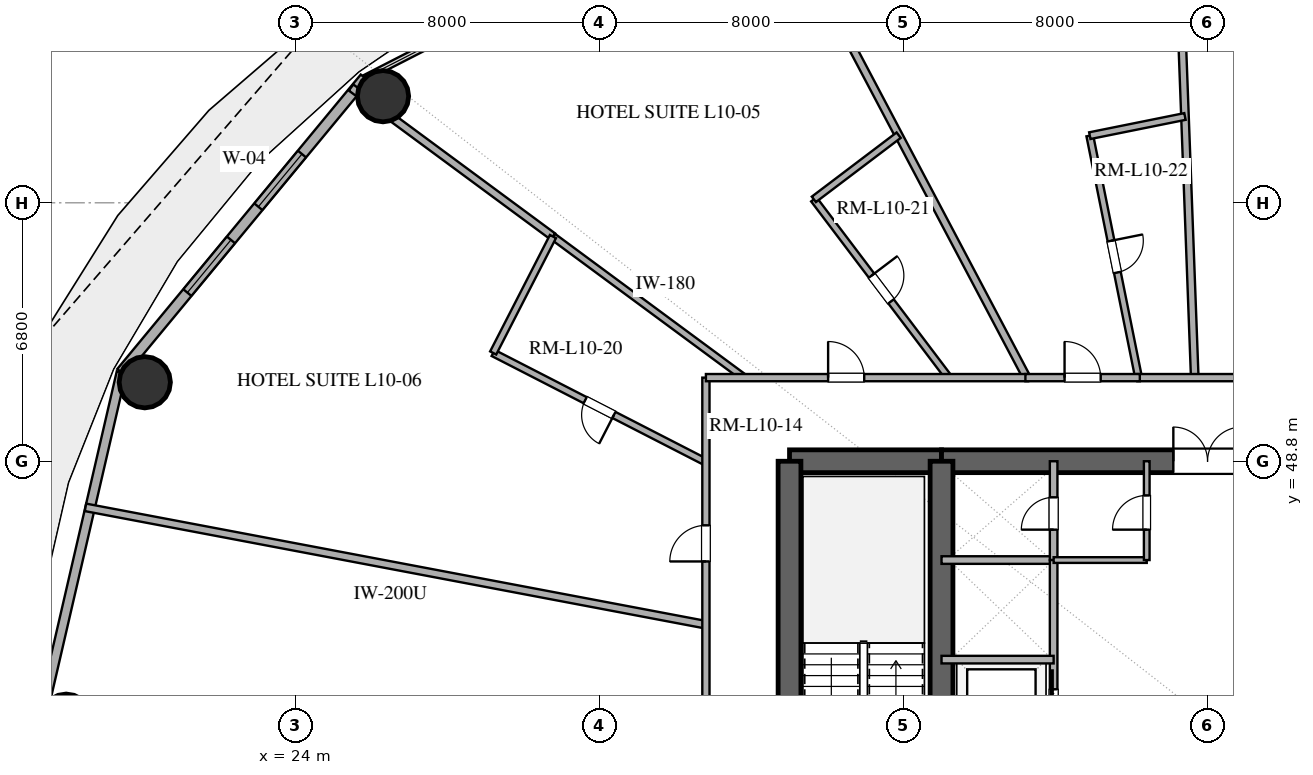
"""IFC4 building model, lengths in metres.
Left out: names, types, materials, properties, quantities, classifications, styles, units other than length and angle.
Written with IfcOpenShell. Run it as: python <this file> out.ifc"""

import sys

from ifc_helpers import new_model, si_unit, direction, frame, frame_2d, origin, origin_2d, place, context, subcontext, project, spatial, rectangle, hollow_circle, extrude, element, fill, save


model = new_model("IFC4")
c1 = context("Model", 3, precision=1e-05, world=origin(), true_north=direction((0.0, 1.0)))
c2 = subcontext(c1, "Body", "Model", "MODEL_VIEW")
j1 = project(units=[si_unit("LENGTHUNIT", "METRE"), si_unit("PLANEANGLEUNIT", "RADIAN")], contexts=[c1])
p1 = place(None, origin())
s1 = spatial("IfcSite", under=j1, at=p1, CompositionType="ELEMENT")
p2 = place(p1, origin())
s2 = spatial("IfcBuilding", under=s1, at=p2, CompositionType="ELEMENT")
p3 = place(p2, frame((0.0, 0.0, 46.2)))
s3 = spatial("IfcBuildingStorey", under=s2, at=p3, CompositionType="ELEMENT", Elevation=46.2)
p4 = place(p3, frame((37.0, 48.8, 0.0), z_axis=(0.0, 0.0, 1.0), x_axis=(1.0, 0.0, 0.0)))
e1 = element("IfcWall", 1, at=p4, inside=s3, PredefinedType="SHEAR", context=c2, shape_type="SweptSolid", body=[
    extrude(rectangle(XDim=4.0, YDim=0.6, at=frame_2d((2.0, 0.0))), origin(), (0.0, 0.0, 1.0), 3.38),
])
p5 = place(p3, frame((41.0, 48.8, 0.0), z_axis=(0.0, 0.0, 1.0), x_axis=(1.0, 0.0, 0.0)))
e2 = element("IfcWall", 2, at=p5, inside=s3, PredefinedType="SHEAR", context=c2, shape_type="SweptSolid", body=[
    extrude(rectangle(XDim=14.0, YDim=0.6, at=frame_2d((7.0, 0.0))), origin(), (0.0, 0.0, 1.0), 3.38),
])
p6 = place(p5, frame((6.1, 0.0, 0.0)))
e3 = element("IfcOpeningElement", 3, at=p6, cuts=e2, PredefinedType="OPENING", context=c2, shape_type="SweptSolid", body=[
    extrude(rectangle(XDim=1.8, YDim=2.25, at=frame_2d((0.9, 1.125))), frame((0.0, 0.31, 0.0), z_axis=(0.0, -1.0, 0.0), x_axis=(1.0, 0.0, 0.0)), (0.0, 0.0, 1.0), 0.62),
])
p7 = place(p3, frame((37.0, 35.2, 0.0), z_axis=(0.0, 0.0, 1.0), x_axis=(0.0, 1.0, 0.0)))
e4 = element("IfcWall", 4, at=p7, inside=s3, PredefinedType="SHEAR", context=c2, shape_type="SweptSolid", body=[
    extrude(rectangle(XDim=13.6, YDim=0.6, at=frame_2d((6.8, 0.0))), origin(), (0.0, 0.0, 1.0), 3.38),
])
p8 = place(p7, frame((1.5, 0.0, 0.0)))
e5 = element("IfcOpeningElement", 5, at=p8, cuts=e4, PredefinedType="OPENING", context=c2, shape_type="SweptSolid", body=[
    extrude(rectangle(XDim=1.2, YDim=2.15, at=frame_2d((0.6, 1.075))), frame((0.0, 0.31, 0.0), z_axis=(0.0, -1.0, 0.0), x_axis=(1.0, 0.0, 0.0)), (0.0, 0.0, 1.0), 0.62),
])
p9 = place(p3, frame((41.0, 35.2, 0.0), z_axis=(0.0, 0.0, 1.0), x_axis=(0.0, 1.0, 0.0)))
e6 = element("IfcWall", 6, at=p9, inside=s3, PredefinedType="SHEAR", context=c2, shape_type="SweptSolid", body=[
    extrude(rectangle(XDim=13.6, YDim=0.6, at=frame_2d((6.8, 0.0))), origin(), (0.0, 0.0, 1.0), 3.38),
])
p10 = place(p9, frame((1.15, 0.0, 0.0)))
e7 = element("IfcOpeningElement", 7, at=p10, cuts=e6, PredefinedType="OPENING", context=c2, shape_type="SweptSolid", body=[
    extrude(rectangle(XDim=1.1, YDim=2.2, at=frame_2d((0.55, 1.1))), frame((0.0, 0.31, 0.0), z_axis=(0.0, -1.0, 0.0), x_axis=(1.0, 0.0, 0.0)), (0.0, 0.0, 1.0), 0.62),
])
for number, where, z_axis, x_axis in (
    (8, (26.303, 58.405, 0.0), (0.0, 0.0, 1.0), (1.0, 0.0, 0.0)),
    (9, (20.034, 50.878, 0.0), (0.0, 0.0, 1.0), (1.0, 0.0, 0.0)),
    (10, (17.965, 42.0, 0.0), (0.0, 0.0, 1.0), (1.0, 0.0, 0.0)),
):
    element("IfcColumn", number, at=place(p3, frame(where, z_axis=z_axis, x_axis=x_axis)), inside=s3, PredefinedType="COLUMN", context=c2, shape_type="SweptSolid", body=[
        extrude(hollow_circle(Radius=0.675, WallThickness=0.036, at=origin_2d()), origin(), (0.0, 0.0, 1.0), 3.38),
    ])
p11 = place(p3, frame((25.826, 58.886, 0.0), z_axis=(0.0, 0.0, 1.0), x_axis=(-0.637296809613, -0.770618437657, 0.0)))
e11 = element("IfcWall", 11, at=p11, inside=s3, PredefinedType="SOLIDWALL", context=c2, shape_type="SweptSolid", body=[
    extrude(rectangle(XDim=10.053, YDim=0.28, at=frame_2d((5.027, 0.0))), origin(), (0.0, 0.0, 1.0), 3.38),
])
p12 = place(p11, frame((2.598, 0.0, 0.85)))
e12 = element("IfcOpeningElement", 12, at=p12, cuts=e11, PredefinedType="OPENING", context=c2, shape_type="SweptSolid", body=[
    extrude(rectangle(XDim=1.8, YDim=2.2, at=frame_2d((0.9, 1.1))), frame((0.0, 0.15, 0.0), z_axis=(0.0, -1.0, 0.0), x_axis=(1.0, 0.0, 0.0)), (0.0, 0.0, 1.0), 0.3),
])
p13 = place(p11, frame((5.53, 0.0, 0.85)))
e13 = element("IfcOpeningElement", 13, at=p13, cuts=e11, PredefinedType="OPENING", context=c2, shape_type="SweptSolid", body=[
    extrude(rectangle(XDim=1.8, YDim=2.2, at=frame_2d((0.9, 1.1))), frame((0.0, 0.15, 0.0), z_axis=(0.0, -1.0, 0.0), x_axis=(1.0, 0.0, 0.0)), (0.0, 0.0, 1.0), 0.3),
])
p14 = place(p3, frame((19.419, 51.138, 0.0), z_axis=(0.0, 0.0, 1.0), x_axis=(-0.225454452941, -0.974253709076, 0.0)))
e14 = element("IfcWall", 14, at=p14, inside=s3, PredefinedType="SOLIDWALL", context=c2, shape_type="SweptSolid", body=[
    extrude(rectangle(XDim=9.38, YDim=0.25, at=frame_2d((4.69, 0.0))), origin(), (0.0, 0.0, 1.0), 3.38),
])
p15 = place(p3, frame((41.0, 46.2, 0.0), z_axis=(0.0, 0.0, 1.0), x_axis=(1.0, 0.0, 0.0)))
e15 = element("IfcWall", 15, at=p15, inside=s3, PredefinedType="SOLIDWALL", context=c2, shape_type="SweptSolid", body=[
    extrude(rectangle(XDim=2.95, YDim=0.2, at=frame_2d((1.475, 0.0))), origin(), (0.0, 0.0, 1.0), 2.74),
])
p16 = place(p3, frame((43.95, 46.2, 0.0), z_axis=(0.0, 0.0, 1.0), x_axis=(0.0, 1.0, 0.0)))
e16 = element("IfcWall", 16, at=p16, inside=s3, PredefinedType="SOLIDWALL", context=c2, shape_type="SweptSolid", body=[
    extrude(rectangle(XDim=2.6, YDim=0.2, at=frame_2d((1.3, 0.0))), origin(), (0.0, 0.0, 1.0), 2.74),
])
p17 = place(p16, frame((0.8, 0.0, 0.0)))
e17 = element("IfcOpeningElement", 17, at=p17, cuts=e16, PredefinedType="OPENING", context=c2, shape_type="SweptSolid", body=[
    extrude(rectangle(XDim=0.85, YDim=2.15, at=frame_2d((0.425, 1.075))), frame((0.0, 0.11, 0.0), z_axis=(0.0, -1.0, 0.0), x_axis=(1.0, 0.0, 0.0)), (0.0, 0.0, 1.0), 0.22),
])
p18 = place(p3, frame((43.95, 38.4, 0.0), z_axis=(0.0, 0.0, 1.0), x_axis=(0.0, 1.0, 0.0)))
e18 = element("IfcWall", 18, at=p18, inside=s3, PredefinedType="SOLIDWALL", context=c2, shape_type="SweptSolid", body=[
    extrude(rectangle(XDim=7.8, YDim=0.2, at=frame_2d((3.9, 0.0))), origin(), (0.0, 0.0, 1.0), 2.74),
])
p19 = place(p18, frame((0.7, 0.0, 0.0)))
e19 = element("IfcOpeningElement", 19, at=p19, cuts=e18, PredefinedType="OPENING", context=c2, shape_type="SweptSolid", body=[
    extrude(rectangle(XDim=1.1, YDim=2.2, at=frame_2d((0.55, 1.1))), frame((0.0, 0.11, 0.0), z_axis=(0.0, -1.0, 0.0), x_axis=(1.0, 0.0, 0.0)), (0.0, 0.0, 1.0), 0.22),
])
p20 = place(p18, frame((3.3, 0.0, 0.0)))
e20 = element("IfcOpeningElement", 20, at=p20, cuts=e18, PredefinedType="OPENING", context=c2, shape_type="SweptSolid", body=[
    extrude(rectangle(XDim=1.1, YDim=2.2, at=frame_2d((0.55, 1.1))), frame((0.0, 0.11, 0.0), z_axis=(0.0, -1.0, 0.0), x_axis=(1.0, 0.0, 0.0)), (0.0, 0.0, 1.0), 0.22),
])
p21 = place(p3, frame((41.0, 43.58, 0.0), z_axis=(0.0, 0.0, 1.0), x_axis=(1.0, 0.0, 0.0)))
e21 = element("IfcWall", 21, at=p21, inside=s3, PredefinedType="SOLIDWALL", context=c2, shape_type="SweptSolid", body=[
    extrude(rectangle(XDim=2.95, YDim=0.2, at=frame_2d((1.475, 0.0))), origin(), (0.0, 0.0, 1.0), 2.74),
])
p22 = place(p3, frame((43.95, 46.2, 0.0), z_axis=(0.0, 0.0, 1.0), x_axis=(1.0, 0.0, 0.0)))
e22 = element("IfcWall", 22, at=p22, inside=s3, PredefinedType="PARTITIONING", context=c2, shape_type="SweptSolid", body=[
    extrude(rectangle(XDim=2.45, YDim=0.15, at=frame_2d((1.225, 0.0))), origin(), (0.0, 0.0, 1.0), 2.74),
])
p23 = place(p3, frame((46.4, 46.2, 0.0), z_axis=(0.0, 0.0, 1.0), x_axis=(0.0, 1.0, 0.0)))
e23 = element("IfcWall", 23, at=p23, inside=s3, PredefinedType="PARTITIONING", context=c2, shape_type="SweptSolid", body=[
    extrude(rectangle(XDim=2.6, YDim=0.15, at=frame_2d((1.3, 0.0))), origin(), (0.0, 0.0, 1.0), 2.74),
])
p24 = place(p23, frame((0.8, 0.0, 0.0)))
e24 = element("IfcOpeningElement", 24, at=p24, cuts=e23, PredefinedType="OPENING", context=c2, shape_type="SweptSolid", body=[
    extrude(rectangle(XDim=0.9, YDim=2.15, at=frame_2d((0.45, 1.075))), frame((0.0, 0.085, 0.0), z_axis=(0.0, -1.0, 0.0), x_axis=(1.0, 0.0, 0.0)), (0.0, 0.0, 1.0), 0.17),
])
p25 = place(p3, frame((34.8, 44.498, 0.0), z_axis=(0.0, 0.0, 1.0), x_axis=(-0.982565603173, 0.185916205484, 0.0)))
e25 = element("IfcWall", 25, at=p25, inside=s3, PredefinedType="PARTITIONING", context=c2, shape_type="SweptSolid", body=[
    extrude(rectangle(XDim=16.616, YDim=0.2, at=frame_2d((8.308, 0.0))), origin(), (0.0, 0.0, 1.0), 2.74),
])
p26 = place(p3, frame((47.663, 51.0, 0.0), z_axis=(0.0, 0.0, 1.0), x_axis=(-0.037384345878, 0.999300961014, 0.0)))
e26 = element("IfcWall", 26, at=p26, inside=s3, PredefinedType="PARTITIONING", context=c2, shape_type="SweptSolid", body=[
    extrude(rectangle(XDim=14.877, YDim=0.2, at=frame_2d((7.438, 0.0))), origin(), (0.0, 0.0, 1.0), 2.74),
])
p27 = place(p3, frame((43.243, 51.0, 0.0), z_axis=(0.0, 0.0, 1.0), x_axis=(-0.467270516294, 0.884114395654, 0.0)))
e27 = element("IfcWall", 27, at=p27, inside=s3, PredefinedType="PARTITIONING", context=c2, shape_type="SweptSolid", body=[
    extrude(rectangle(XDim=14.96, YDim=0.2, at=frame_2d((7.48, 0.0))), origin(), (0.0, 0.0, 1.0), 2.74),
])
p28 = place(p3, frame((25.462, 58.634, 0.0), z_axis=(0.0, 0.0, 1.0), x_axis=(0.804616980297, -0.593794168898, 0.0)))
e28 = element("IfcWall", 28, at=p28, inside=s3, PredefinedType="PARTITIONING", context=c2, shape_type="SweptSolid", body=[
    extrude(rectangle(XDim=6.603, YDim=0.2, at=frame_2d((3.302, 0.0))), origin(), (0.0, 0.0, 1.0), 2.74),
])
p29 = place(p3, frame((44.902, 57.367, 0.0), z_axis=(0.0, 0.0, 1.0), x_axis=(0.197648412503, -0.980272974755, 0.0)))
e29 = element("IfcWall", 29, at=p29, inside=s3, PredefinedType="PLUMBINGWALL", context=c2, shape_type="SweptSolid", body=[
    extrude(rectangle(XDim=6.495, YDim=0.18, at=frame_2d((3.248, 0.0))), origin(), (0.0, 0.0, 1.0), 2.74),
])
p30 = place(p29, frame((2.823, 0.0, 0.0)))
e30 = element("IfcOpeningElement", 30, at=p30, cuts=e29, PredefinedType="OPENING", context=c2, shape_type="SweptSolid", body=[
    extrude(rectangle(XDim=0.85, YDim=2.1, at=frame_2d((0.425, 1.05))), frame((0.0, 0.1, 0.0), z_axis=(0.0, -1.0, 0.0), x_axis=(1.0, 0.0, 0.0)), (0.0, 0.0, 1.0), 0.2),
])
p31 = place(p3, frame((34.8, 48.776, 0.0), z_axis=(0.0, 0.0, 1.0), x_axis=(-0.889651376734, 0.456640370395, 0.0)))
e31 = element("IfcWall", 31, at=p31, inside=s3, PredefinedType="PLUMBINGWALL", context=c2, shape_type="SweptSolid", body=[
    extrude(rectangle(XDim=6.292, YDim=0.18, at=frame_2d((3.146, 0.0))), origin(), (0.0, 0.0, 1.0), 2.74),
])
p32 = place(p31, frame((2.721, 0.0, 0.0)))
e32 = element("IfcOpeningElement", 32, at=p32, cuts=e31, PredefinedType="OPENING", context=c2, shape_type="SweptSolid", body=[
    extrude(rectangle(XDim=0.85, YDim=2.1, at=frame_2d((0.425, 1.05))), frame((0.0, 0.1, 0.0), z_axis=(0.0, -1.0, 0.0), x_axis=(1.0, 0.0, 0.0)), (0.0, 0.0, 1.0), 0.2),
])
p33 = place(p3, frame((30.775, 54.713, 0.0), z_axis=(0.0, 0.0, 1.0), x_axis=(0.804582519588, -0.593840861825, 0.0)))
e33 = element("IfcWall", 33, at=p33, inside=s3, PredefinedType="PLUMBINGWALL", context=c2, shape_type="SweptSolid", body=[
    extrude(rectangle(XDim=6.252, YDim=0.18, at=frame_2d((3.126, 0.0))), origin(), (0.0, 0.0, 1.0), 2.74),
])
p34 = place(p3, frame((34.8, 36.017, 0.0), z_axis=(0.0, 0.0, 1.0), x_axis=(0.0, 1.0, 0.0)))
e34 = element("IfcWall", 34, at=p34, inside=s3, PredefinedType="PARTITIONING", context=c2, shape_type="SweptSolid", body=[
    extrude(rectangle(XDim=14.983, YDim=0.19, at=frame_2d((7.492, 0.0))), origin(), (0.0, 0.0, 1.0), 2.74),
])
p35 = place(p34, frame((4.963, 0.0, 0.0)))
e35 = element("IfcOpeningElement", 35, at=p35, cuts=e34, PredefinedType="OPENING", context=c2, shape_type="SweptSolid", body=[
    extrude(rectangle(XDim=1.0, YDim=2.2, at=frame_2d((0.5, 1.1))), frame((0.0, 0.105, 0.0), z_axis=(0.0, -1.0, 0.0), x_axis=(1.0, 0.0, 0.0)), (0.0, 0.0, 1.0), 0.21),
])
p36 = place(p34, frame((10.146, 0.0, 0.0)))
e36 = element("IfcOpeningElement", 36, at=p36, cuts=e34, PredefinedType="OPENING", context=c2, shape_type="SweptSolid", body=[
    extrude(rectangle(XDim=0.95, YDim=2.15, at=frame_2d((0.475, 1.075))), frame((0.0, 0.105, 0.0), z_axis=(0.0, -1.0, 0.0), x_axis=(1.0, 0.0, 0.0)), (0.0, 0.0, 1.0), 0.21),
])
p37 = place(p3, frame((37.64, 55.691, 0.0), z_axis=(0.0, 0.0, 1.0), x_axis=(0.603401299207, -0.797437691682, 0.0)))
e37 = element("IfcWall", 37, at=p37, inside=s3, PredefinedType="PLUMBINGWALL", context=c2, shape_type="SweptSolid", body=[
    extrude(rectangle(XDim=5.882, YDim=0.18, at=frame_2d((2.941, 0.0))), origin(), (0.0, 0.0, 1.0), 2.74),
])
p38 = place(p37, frame((2.516, 0.0, 0.0)))
e38 = element("IfcOpeningElement", 38, at=p38, cuts=e37, PredefinedType="OPENING", context=c2, shape_type="SweptSolid", body=[
    extrude(rectangle(XDim=0.85, YDim=2.1, at=frame_2d((0.425, 1.05))), frame((0.0, 0.1, 0.0), z_axis=(0.0, -1.0, 0.0), x_axis=(1.0, 0.0, 0.0)), (0.0, 0.0, 1.0), 0.2),
])
p39 = place(p3, frame((34.8, 51.0, 0.0), z_axis=(0.0, 0.0, 1.0), x_axis=(1.0, 0.0, 0.0)))
e39 = element("IfcWall", 39, at=p39, inside=s3, PredefinedType="PARTITIONING", context=c2, shape_type="SweptSolid", body=[
    extrude(rectangle(XDim=8.479, YDim=0.19, at=frame_2d((4.24, 0.0))), origin(), (0.0, 0.0, 1.0), 2.74),
])
p40 = place(p39, frame((3.216, 0.0, 0.0)))
e40 = element("IfcOpeningElement", 40, at=p40, cuts=e39, PredefinedType="OPENING", context=c2, shape_type="SweptSolid", body=[
    extrude(rectangle(XDim=0.95, YDim=2.15, at=frame_2d((0.475, 1.075))), frame((0.0, 0.105, 0.0), z_axis=(0.0, -1.0, 0.0), x_axis=(1.0, 0.0, 0.0)), (0.0, 0.0, 1.0), 0.21),
])
p41 = place(p3, frame((46.153, 51.0, 0.0), z_axis=(0.0, 0.0, 1.0), x_axis=(1.0, 0.0, 0.0)))
e41 = element("IfcWall", 41, at=p41, inside=s3, PredefinedType="PARTITIONING", context=c2, shape_type="SweptSolid", body=[
    extrude(rectangle(XDim=15.047, YDim=0.19, at=frame_2d((7.524, 0.0))), origin(), (0.0, 0.0, 1.0), 2.74),
])
p42 = place(p41, frame((3.144, 0.0, 0.0)))
e42 = element("IfcOpeningElement", 42, at=p42, cuts=e41, PredefinedType="OPENING", context=c2, shape_type="SweptSolid", body=[
    extrude(rectangle(XDim=1.0, YDim=2.2, at=frame_2d((0.5, 1.1))), frame((0.0, 0.105, 0.0), z_axis=(0.0, -1.0, 0.0), x_axis=(1.0, 0.0, 0.0)), (0.0, 0.0, 1.0), 0.21),
])
p43 = place(p41, frame((7.119, 0.0, 0.0)))
e43 = element("IfcOpeningElement", 43, at=p43, cuts=e41, PredefinedType="OPENING", context=c2, shape_type="SweptSolid", body=[
    extrude(rectangle(XDim=0.95, YDim=2.15, at=frame_2d((0.475, 1.075))), frame((0.0, 0.105, 0.0), z_axis=(0.0, -1.0, 0.0), x_axis=(1.0, 0.0, 0.0)), (0.0, 0.0, 1.0), 0.21),
])
p44 = place(p3, frame((29.202, 51.649, 0.0), z_axis=(0.0, 0.0, 1.0), x_axis=(0.456659133546, 0.889641745732, 0.0)))
e44 = element("IfcWall", 44, at=p44, inside=s3, PredefinedType="PLUMBINGWALL", context=c2, shape_type="SweptSolid", body=[
    extrude(rectangle(XDim=3.444, YDim=0.18, at=frame_2d((1.722, 0.0))), origin(), (0.0, 0.0, 1.0), 2.74),
])
p45 = place(p3, frame((43.207, 51.0, 0.0), z_axis=(0.0, 0.0, 1.0), x_axis=(1.0, 0.0, 0.0)))
e45 = element("IfcWall", 45, at=p45, inside=s3, PredefinedType="PARTITIONING", context=c2, shape_type="SweptSolid", body=[
    extrude(rectangle(XDim=3.011, YDim=0.19, at=frame_2d((1.505, 0.0))), origin(), (0.0, 0.0, 1.0), 2.74),
])
p46 = place(p45, frame((1.03, 0.0, 0.0)))
e46 = element("IfcOpeningElement", 46, at=p46, cuts=e45, PredefinedType="OPENING", context=c2, shape_type="SweptSolid", body=[
    extrude(rectangle(XDim=0.95, YDim=2.15, at=frame_2d((0.475, 1.075))), frame((0.0, 0.105, 0.0), z_axis=(0.0, -1.0, 0.0), x_axis=(1.0, 0.0, 0.0)), (0.0, 0.0, 1.0), 0.21),
])
p47 = place(p3, frame((39.872, 57.379, 0.0), z_axis=(0.0, 0.0, 1.0), x_axis=(-0.797438154909, -0.603400687019, 0.0)))
e47 = element("IfcWall", 47, at=p47, inside=s3, PredefinedType="PLUMBINGWALL", context=c2, shape_type="SweptSolid", body=[
    extrude(rectangle(XDim=2.798, YDim=0.18, at=frame_2d((1.399, 0.0))), origin(), (0.0, 0.0, 1.0), 2.74),
])
p48 = place(p3, frame((47.406, 57.872, 0.0), z_axis=(0.0, 0.0, 1.0), x_axis=(-0.980278128955, -0.1976228476, 0.0)))
e48 = element("IfcWall", 48, at=p48, inside=s3, PredefinedType="PLUMBINGWALL", context=c2, shape_type="SweptSolid", body=[
    extrude(rectangle(XDim=2.555, YDim=0.18, at=frame_2d((1.277, 0.0))), origin(), (0.0, 0.0, 1.0), 2.74),
])
p49 = place(p12, origin())
e49 = element("IfcWindow", 49, at=p49, inside=s3, PartitioningType="SINGLE_PANEL", PredefinedType="WINDOW", context=c2, shape_type="SweptSolid", body=[
    extrude(rectangle(XDim=1.8, YDim=2.2, at=frame_2d((0.9, 1.1))), frame((0.0, 0.03, 0.0), z_axis=(0.0, -1.0, 0.0), x_axis=(1.0, 0.0, 0.0)), (0.0, 0.0, 1.0), 0.06),
])
fill(e12, e49)
p50 = place(p13, origin())
e50 = element("IfcWindow", 50, at=p50, inside=s3, PartitioningType="SINGLE_PANEL", PredefinedType="WINDOW", context=c2, shape_type="SweptSolid", body=[
    extrude(rectangle(XDim=1.8, YDim=2.2, at=frame_2d((0.9, 1.1))), frame((0.0, 0.03, 0.0), z_axis=(0.0, -1.0, 0.0), x_axis=(1.0, 0.0, 0.0)), (0.0, 0.0, 1.0), 0.06),
])
fill(e13, e50)
p51 = place(p6, origin())
e51 = element("IfcDoor", 51, at=p51, inside=s3, OperationType="DOUBLE_DOOR_SINGLE_SWING", PredefinedType="DOOR", context=c2, shape_type="SweptSolid", body=[
    extrude(rectangle(XDim=1.8, YDim=2.25, at=frame_2d((0.9, 1.125))), frame((0.0, 0.025, 0.0), z_axis=(0.0, -1.0, 0.0), x_axis=(1.0, 0.0, 0.0)), (0.0, 0.0, 1.0), 0.05),
])
fill(e3, e51)
p52 = place(p17, origin())
e52 = element("IfcDoor", 52, at=p52, inside=s3, OperationType="SINGLE_SWING_LEFT", PredefinedType="DOOR", context=c2, shape_type="SweptSolid", body=[
    extrude(rectangle(XDim=0.85, YDim=2.15, at=frame_2d((0.425, 1.075))), frame((0.0, 0.025, 0.0), z_axis=(0.0, -1.0, 0.0), x_axis=(1.0, 0.0, 0.0)), (0.0, 0.0, 1.0), 0.05),
])
fill(e17, e52)
p53 = place(p20, origin())
e53 = element("IfcDoor", 53, at=p53, inside=s3, OperationType="SLIDING_TO_RIGHT", PredefinedType="DOOR", context=c2, shape_type="SweptSolid", body=[
    extrude(rectangle(XDim=1.1, YDim=2.2, at=frame_2d((0.55, 1.1))), frame((0.0, 0.025, 0.0), z_axis=(0.0, -1.0, 0.0), x_axis=(1.0, 0.0, 0.0)), (0.0, 0.0, 1.0), 0.05),
])
fill(e20, e53)
p54 = place(p24, origin())
e54 = element("IfcDoor", 54, at=p54, inside=s3, OperationType="SINGLE_SWING_LEFT", PredefinedType="DOOR", context=c2, shape_type="SweptSolid", body=[
    extrude(rectangle(XDim=0.9, YDim=2.15, at=frame_2d((0.45, 1.075))), frame((0.0, 0.025, 0.0), z_axis=(0.0, -1.0, 0.0), x_axis=(1.0, 0.0, 0.0)), (0.0, 0.0, 1.0), 0.05),
])
fill(e24, e54)
p55 = place(p30, origin())
e55 = element("IfcDoor", 55, at=p55, inside=s3, OperationType="SINGLE_SWING_LEFT", PredefinedType="DOOR", context=c2, shape_type="SweptSolid", body=[
    extrude(rectangle(XDim=0.85, YDim=2.1, at=frame_2d((0.425, 1.05))), frame((0.0, 0.025, 0.0), z_axis=(0.0, -1.0, 0.0), x_axis=(1.0, 0.0, 0.0)), (0.0, 0.0, 1.0), 0.05),
])
fill(e30, e55)
p56 = place(p32, origin())
e56 = element("IfcDoor", 56, at=p56, inside=s3, OperationType="SINGLE_SWING_LEFT", PredefinedType="DOOR", context=c2, shape_type="SweptSolid", body=[
    extrude(rectangle(XDim=0.85, YDim=2.1, at=frame_2d((0.425, 1.05))), frame((0.0, 0.025, 0.0), z_axis=(0.0, -1.0, 0.0), x_axis=(1.0, 0.0, 0.0)), (0.0, 0.0, 1.0), 0.05),
])
fill(e32, e56)
p57 = place(p36, origin())
e57 = element("IfcDoor", 57, at=p57, inside=s3, OperationType="SINGLE_SWING_LEFT", PredefinedType="DOOR", context=c2, shape_type="SweptSolid", body=[
    extrude(rectangle(XDim=0.95, YDim=2.15, at=frame_2d((0.475, 1.075))), frame((0.0, 0.025, 0.0), z_axis=(0.0, -1.0, 0.0), x_axis=(1.0, 0.0, 0.0)), (0.0, 0.0, 1.0), 0.05),
])
fill(e36, e57)
p58 = place(p38, origin())
e58 = element("IfcDoor", 58, at=p58, inside=s3, OperationType="SINGLE_SWING_LEFT", PredefinedType="DOOR", context=c2, shape_type="SweptSolid", body=[
    extrude(rectangle(XDim=0.85, YDim=2.1, at=frame_2d((0.425, 1.05))), frame((0.0, 0.025, 0.0), z_axis=(0.0, -1.0, 0.0), x_axis=(1.0, 0.0, 0.0)), (0.0, 0.0, 1.0), 0.05),
])
fill(e38, e58)
p59 = place(p40, origin())
e59 = element("IfcDoor", 59, at=p59, inside=s3, OperationType="SINGLE_SWING_LEFT", PredefinedType="DOOR", context=c2, shape_type="SweptSolid", body=[
    extrude(rectangle(XDim=0.95, YDim=2.15, at=frame_2d((0.475, 1.075))), frame((0.0, 0.025, 0.0), z_axis=(0.0, -1.0, 0.0), x_axis=(1.0, 0.0, 0.0)), (0.0, 0.0, 1.0), 0.05),
])
fill(e40, e59)
p60 = place(p46, origin())
e60 = element("IfcDoor", 60, at=p60, inside=s3, OperationType="SINGLE_SWING_LEFT", PredefinedType="DOOR", context=c2, shape_type="SweptSolid", body=[
    extrude(rectangle(XDim=0.95, YDim=2.15, at=frame_2d((0.475, 1.075))), frame((0.0, 0.025, 0.0), z_axis=(0.0, -1.0, 0.0), x_axis=(1.0, 0.0, 0.0)), (0.0, 0.0, 1.0), 0.05),
])
fill(e46, e60)
save(model, sys.argv[1])
